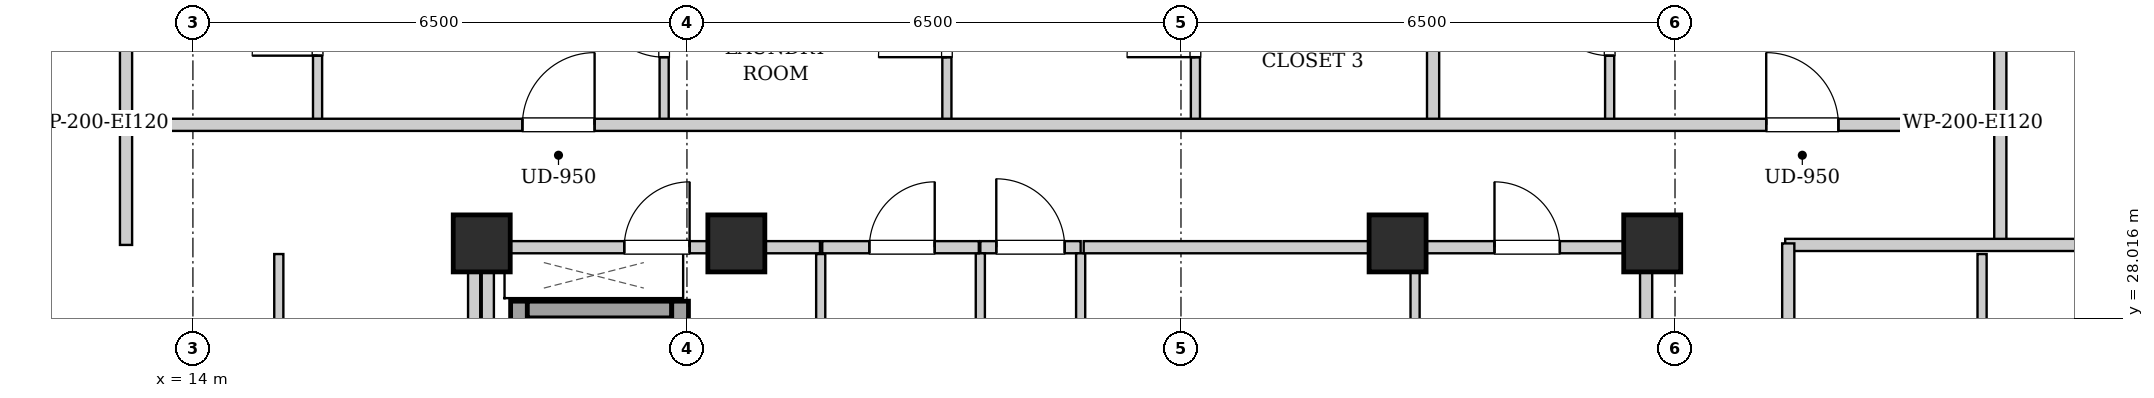
"""IFC4 building model, lengths in metres.
Left out: names, types, materials, properties, quantities, classifications, styles, units other than length and angle.
Written with IfcOpenShell. Run it as: python <this file> out.ifc"""

import sys

from ifc_helpers import new_model, si_unit, direction, frame, frame_2d, origin, origin_2d, place, context, subcontext, project, spatial, rectangle, extrude, element, fill, save


model = new_model("IFC4")
c1 = context("Model", 3, precision=1e-05, world=origin(), true_north=direction((0.0, 1.0)))
c2 = subcontext(c1, "Body", "Model", "MODEL_VIEW")
j1 = project(units=[si_unit("LENGTHUNIT", "METRE"), si_unit("PLANEANGLEUNIT", "RADIAN")], contexts=[c1])
p1 = place(None, origin())
s1 = spatial("IfcSite", under=j1, at=p1, CompositionType="ELEMENT")
p2 = place(p1, origin())
s2 = spatial("IfcBuilding", under=s1, at=p2, CompositionType="ELEMENT")
p3 = place(p2, frame((0.0, 0.0, 227.5)))
s3 = spatial("IfcBuildingStorey", under=s2, at=p3, CompositionType="ELEMENT", Elevation=227.5)
for number, where, z_axis, x_axis in (
    (1, (17.8, 29.0, 0.0), (0.0, 0.0, 1.0), (1.0, 0.0, 0.0)),
    (2, (21.15, 29.0, 0.0), (0.0, 0.0, 1.0), (1.0, 0.0, 0.0)),
    (3, (29.85, 29.0, 0.0), (0.0, 0.0, 1.0), (1.0, 0.0, 0.0)),
    (4, (33.2, 29.0, 0.0), (0.0, 0.0, 1.0), (1.0, 0.0, 0.0)),
):
    element("IfcColumn", number, at=place(p3, frame(where, z_axis=z_axis, x_axis=x_axis)), inside=s3, PredefinedType="COLUMN", context=c2, shape_type="SweptSolid", body=[
        extrude(rectangle(XDim=0.75, YDim=0.75, at=origin_2d()), origin(), (0.0, 0.0, 1.0), 3.4),
    ])
p4 = place(p3, frame((18.29, 24.1, 0.0), z_axis=(0.0, 0.0, 1.0), x_axis=(0.0, 1.0, 0.0)))
e5 = element("IfcWall", 5, at=p4, inside=s3, PredefinedType="SHEAR", context=c2, shape_type="SweptSolid", body=[
    extrude(rectangle(XDim=4.14, YDim=0.22, at=frame_2d((2.07, 0.0))), origin(), (0.0, 0.0, 1.0), 3.14),
])
p5 = place(p3, frame((18.4, 28.13, 0.0), z_axis=(0.0, 0.0, 1.0), x_axis=(1.0, 0.0, 0.0)))
e6 = element("IfcWall", 6, at=p5, inside=s3, PredefinedType="SHEAR", context=c2, shape_type="SweptSolid", body=[
    extrude(rectangle(XDim=1.9, YDim=0.22, at=frame_2d((0.95, 0.0))), origin(), (0.0, 0.0, 1.0), 3.14),
])
p6 = place(p3, frame((20.41, 26.06, 0.0), z_axis=(0.0, 0.0, 1.0), x_axis=(0.0, 1.0, 0.0)))
e7 = element("IfcWall", 7, at=p6, inside=s3, PredefinedType="SHEAR", context=c2, shape_type="SweptSolid", body=[
    extrude(rectangle(XDim=2.18, YDim=0.22, at=frame_2d((1.09, 0.0))), origin(), (0.0, 0.0, 1.0), 3.14),
])
p7 = place(p6, frame((0.54, 0.0, 0.0)))
e8 = element("IfcOpeningElement", 8, at=p7, cuts=e7, PredefinedType="OPENING", context=c2, shape_type="SweptSolid", body=[
    extrude(rectangle(XDim=1.1, YDim=2.15, at=frame_2d((0.55, 1.075))), frame((0.0, 0.12, 0.0), z_axis=(0.0, -1.0, 0.0), x_axis=(1.0, 0.0, 0.0)), (0.0, 0.0, 1.0), 0.24),
])
for number, where, z_axis, x_axis in (
    (9, (17.88, 24.12, 0.0), (0.0, 0.0, 1.0), (0.0, 1.0, 0.0)),
    (10, (33.12, 24.12, 0.0), (0.0, 0.0, 1.0), (0.0, 1.0, 0.0)),
):
    element("IfcWall", number, at=place(p3, frame(where, z_axis=z_axis, x_axis=x_axis)), inside=s3, PredefinedType="PARTITIONING", context=c2, shape_type="SweptSolid", body=[
        extrude(rectangle(XDim=4.76, YDim=0.16, at=frame_2d((2.38, 0.0))), origin(), (0.0, 0.0, 1.0), 2.475),
    ])
p8 = place(p3, frame((24.36, 28.95, 0.0), z_axis=(0.0, 0.0, 1.0), x_axis=(1.0, 0.0, 0.0)))
e11 = element("IfcWall", 11, at=p8, inside=s3, PredefinedType="PARTITIONING", context=c2, shape_type="SweptSolid", body=[
    extrude(rectangle(XDim=1.32, YDim=0.16, at=frame_2d((0.66, 0.0))), origin(), (0.0, 0.0, 1.0), 2.668),
])
p9 = place(p8, frame((0.21, 0.0, 0.0)))
e12 = element("IfcOpeningElement", 12, at=p9, cuts=e11, PredefinedType="OPENING", context=c2, shape_type="SweptSolid", body=[
    extrude(rectangle(XDim=0.9, YDim=2.05, at=frame_2d((0.45, 1.025))), frame((0.0, 0.09, 0.0), z_axis=(0.0, -1.0, 0.0), x_axis=(1.0, 0.0, 0.0)), (0.0, 0.0, 1.0), 0.18),
])
p10 = place(p3, frame((17.96, 28.95, 0.0), z_axis=(0.0, 0.0, 1.0), x_axis=(1.0, 0.0, 0.0)))
e13 = element("IfcWall", 13, at=p10, inside=s3, PredefinedType="PARTITIONING", context=c2, shape_type="SweptSolid", body=[
    extrude(rectangle(XDim=4.29, YDim=0.16, at=frame_2d((2.145, 0.0))), origin(), (0.0, 0.0, 1.0), 2.668),
])
p11 = place(p10, frame((1.715, 0.0, 0.0)))
e14 = element("IfcOpeningElement", 14, at=p11, cuts=e13, PredefinedType="OPENING", context=c2, shape_type="SweptSolid", body=[
    extrude(rectangle(XDim=0.86, YDim=2.05, at=frame_2d((0.43, 1.025))), frame((0.0, 0.09, 0.0), z_axis=(0.0, -1.0, 0.0), x_axis=(1.0, 0.0, 0.0)), (0.0, 0.0, 1.0), 0.18),
])
for number, where, z_axis, x_axis in (
    (15, (24.36, 25.0, 0.0), (0.0, 0.0, 1.0), (0.0, 1.0, 0.0)),
    (16, (25.68, 25.0, 0.0), (0.0, 0.0, 1.0), (0.0, 1.0, 0.0)),
):
    element("IfcWall", number, at=place(p3, frame(where, z_axis=z_axis, x_axis=x_axis)), inside=s3, PredefinedType="PARTITIONING", context=c2, shape_type="SweptSolid", body=[
        extrude(rectangle(XDim=3.87, YDim=0.12, at=frame_2d((1.935, 0.0))), origin(), (0.0, 0.0, 1.0), 3.14),
    ])
p12 = place(p3, frame((30.08, 26.18, 0.0), z_axis=(0.0, 0.0, 1.0), x_axis=(0.0, 1.0, 0.0)))
e17 = element("IfcWall", 17, at=p12, inside=s3, PredefinedType="PARTITIONING", context=c2, shape_type="SweptSolid", body=[
    extrude(rectangle(XDim=2.68, YDim=0.12, at=frame_2d((1.34, 0.0))), origin(), (0.0, 0.0, 1.0), 3.14),
])
p13 = place(p3, frame((30.08, 28.95, 0.0), z_axis=(0.0, 0.0, 1.0), x_axis=(1.0, 0.0, 0.0)))
e18 = element("IfcWall", 18, at=p13, inside=s3, PredefinedType="PARTITIONING", context=c2, shape_type="SweptSolid", body=[
    extrude(rectangle(XDim=2.96, YDim=0.16, at=frame_2d((1.48, 0.0))), origin(), (0.0, 0.0, 1.0), 3.14),
])
p14 = place(p13, frame((1.045, 0.0, 0.0)))
e19 = element("IfcOpeningElement", 19, at=p14, cuts=e18, PredefinedType="OPENING", context=c2, shape_type="SweptSolid", body=[
    extrude(rectangle(XDim=0.86, YDim=2.05, at=frame_2d((0.43, 1.025))), frame((0.0, 0.09, 0.0), z_axis=(0.0, -1.0, 0.0), x_axis=(1.0, 0.0, 0.0)), (0.0, 0.0, 1.0), 0.18),
])
p15 = place(p3, frame((22.26, 25.0, 0.0), z_axis=(0.0, 0.0, 1.0), x_axis=(0.0, 1.0, 0.0)))
e20 = element("IfcWall", 20, at=p15, inside=s3, PredefinedType="PARTITIONING", context=c2, shape_type="SweptSolid", body=[
    extrude(rectangle(XDim=3.86, YDim=0.12, at=frame_2d((1.93, 0.0))), origin(), (0.0, 0.0, 1.0), 3.14),
])
p16 = place(p3, frame((22.28, 28.95, 0.0), z_axis=(0.0, 0.0, 1.0), x_axis=(1.0, 0.0, 0.0)))
e21 = element("IfcWall", 21, at=p16, inside=s3, PredefinedType="PARTITIONING", context=c2, shape_type="SweptSolid", body=[
    extrude(rectangle(XDim=2.06, YDim=0.16, at=frame_2d((1.03, 0.0))), origin(), (0.0, 0.0, 1.0), 2.668),
])
p17 = place(p16, frame((0.62, 0.0, 0.0)))
e22 = element("IfcOpeningElement", 22, at=p17, cuts=e21, PredefinedType="OPENING", context=c2, shape_type="SweptSolid", body=[
    extrude(rectangle(XDim=0.86, YDim=2.05, at=frame_2d((0.43, 1.025))), frame((0.0, 0.09, 0.0), z_axis=(0.0, -1.0, 0.0), x_axis=(1.0, 0.0, 0.0)), (0.0, 0.0, 1.0), 0.18),
])
p18 = place(p3, frame((25.72, 28.95, 0.0), z_axis=(0.0, 0.0, 1.0), x_axis=(1.0, 0.0, 0.0)))
e23 = element("IfcWall", 23, at=p18, inside=s3, PredefinedType="PARTITIONING", context=c2, shape_type="SweptSolid", body=[
    extrude(rectangle(XDim=4.32, YDim=0.16, at=frame_2d((2.16, 0.0))), origin(), (0.0, 0.0, 1.0), 2.668),
])
for number, where, z_axis, x_axis in (
    (24, (13.12, 28.98, 0.0), (0.0, 0.0, 1.0), (0.0, 1.0, 0.0)),
    (25, (37.78, 28.98, 0.0), (0.0, 0.0, 1.0), (0.0, 1.0, 0.0)),
):
    element("IfcWall", number, at=place(p3, frame(where, z_axis=z_axis, x_axis=x_axis)), inside=s3, PredefinedType="PARTITIONING", context=c2, shape_type="SweptSolid", body=[
        extrude(rectangle(XDim=1.58, YDim=0.16, at=frame_2d((0.79, 0.0))), origin(), (0.0, 0.0, 1.0), 3.14),
    ])
p19 = place(p3, frame((34.95, 28.98, 0.0), z_axis=(0.0, 0.0, 1.0), x_axis=(1.0, 0.0, 0.0)))
e26 = element("IfcWall", 26, at=p19, inside=s3, PredefinedType="PARTITIONING", context=c2, shape_type="SweptSolid", body=[
    extrude(rectangle(XDim=5.07, YDim=0.16, at=frame_2d((2.535, 0.0))), origin(), (0.0, 0.0, 1.0), 2.668),
])
p20 = place(p3, frame((13.12, 30.6, 0.0), z_axis=(0.0, 0.0, 1.0), x_axis=(0.0, 1.0, 0.0)))
e27 = element("IfcWall", 27, at=p20, inside=s3, PredefinedType="PARTITIONING", context=c2, shape_type="SweptSolid", body=[
    extrude(rectangle(XDim=2.66, YDim=0.16, at=frame_2d((1.33, 0.0))), origin(), (0.0, 0.0, 1.0), 3.14),
])
p21 = place(p3, frame((15.64, 30.6, 0.0), z_axis=(0.0, 0.0, 1.0), x_axis=(0.0, 1.0, 0.0)))
e28 = element("IfcWall", 28, at=p21, inside=s3, PredefinedType="PARTITIONING", context=c2, shape_type="SweptSolid", body=[
    extrude(rectangle(XDim=2.6, YDim=0.12, at=frame_2d((1.3, 0.0))), origin(), (0.0, 0.0, 1.0), 3.14),
])
p22 = place(p21, frame((0.87, 0.0, 0.0)))
e29 = element("IfcOpeningElement", 29, at=p22, cuts=e28, PredefinedType="OPENING", context=c2, shape_type="SweptSolid", body=[
    extrude(rectangle(XDim=0.86, YDim=2.05, at=frame_2d((0.43, 1.025))), frame((0.0, 0.07, 0.0), z_axis=(0.0, -1.0, 0.0), x_axis=(1.0, 0.0, 0.0)), (0.0, 0.0, 1.0), 0.14),
])
p23 = place(p3, frame((20.2, 30.6, 0.0), z_axis=(0.0, 0.0, 1.0), x_axis=(0.0, 1.0, 0.0)))
e30 = element("IfcWall", 30, at=p23, inside=s3, PredefinedType="PARTITIONING", context=c2, shape_type="SweptSolid", body=[
    extrude(rectangle(XDim=2.6, YDim=0.12, at=frame_2d((1.3, 0.0))), origin(), (0.0, 0.0, 1.0), 3.14),
])
p24 = place(p23, frame((0.85, 0.0, 0.0)))
e31 = element("IfcOpeningElement", 31, at=p24, cuts=e30, PredefinedType="OPENING", context=c2, shape_type="SweptSolid", body=[
    extrude(rectangle(XDim=0.9, YDim=2.05, at=frame_2d((0.45, 1.025))), frame((0.0, 0.07, 0.0), z_axis=(0.0, -1.0, 0.0), x_axis=(1.0, 0.0, 0.0)), (0.0, 0.0, 1.0), 0.14),
])
p25 = place(p3, frame((23.92, 30.6, 0.0), z_axis=(0.0, 0.0, 1.0), x_axis=(0.0, 1.0, 0.0)))
e32 = element("IfcWall", 32, at=p25, inside=s3, PredefinedType="PARTITIONING", context=c2, shape_type="SweptSolid", body=[
    extrude(rectangle(XDim=2.6, YDim=0.12, at=frame_2d((1.3, 0.0))), origin(), (0.0, 0.0, 1.0), 3.14),
])
p26 = place(p25, frame((0.85, 0.0, 0.0)))
e33 = element("IfcOpeningElement", 33, at=p26, cuts=e32, PredefinedType="OPENING", context=c2, shape_type="SweptSolid", body=[
    extrude(rectangle(XDim=0.9, YDim=2.05, at=frame_2d((0.45, 1.025))), frame((0.0, 0.07, 0.0), z_axis=(0.0, -1.0, 0.0), x_axis=(1.0, 0.0, 0.0)), (0.0, 0.0, 1.0), 0.14),
])
p27 = place(p3, frame((27.19, 30.6, 0.0), z_axis=(0.0, 0.0, 1.0), x_axis=(0.0, 1.0, 0.0)))
e34 = element("IfcWall", 34, at=p27, inside=s3, PredefinedType="PARTITIONING", context=c2, shape_type="SweptSolid", body=[
    extrude(rectangle(XDim=2.6, YDim=0.12, at=frame_2d((1.3, 0.0))), origin(), (0.0, 0.0, 1.0), 3.14),
])
p28 = place(p27, frame((0.85, 0.0, 0.0)))
e35 = element("IfcOpeningElement", 35, at=p28, cuts=e34, PredefinedType="OPENING", context=c2, shape_type="SweptSolid", body=[
    extrude(rectangle(XDim=0.9, YDim=2.05, at=frame_2d((0.45, 1.025))), frame((0.0, 0.07, 0.0), z_axis=(0.0, -1.0, 0.0), x_axis=(1.0, 0.0, 0.0)), (0.0, 0.0, 1.0), 0.14),
])
p29 = place(p3, frame((37.78, 30.6, 0.0), z_axis=(0.0, 0.0, 1.0), x_axis=(0.0, 1.0, 0.0)))
e36 = element("IfcWall", 36, at=p29, inside=s3, PredefinedType="PARTITIONING", context=c2, shape_type="SweptSolid", body=[
    extrude(rectangle(XDim=2.66, YDim=0.16, at=frame_2d((1.33, 0.0))), origin(), (0.0, 0.0, 1.0), 3.14),
])
p30 = place(p3, frame((30.317, 30.6, 0.0), z_axis=(0.0, 0.0, 1.0), x_axis=(0.0, 1.0, 0.0)))
e37 = element("IfcWall", 37, at=p30, inside=s3, PredefinedType="PARTITIONING", context=c2, shape_type="SweptSolid", body=[
    extrude(rectangle(XDim=9.32, YDim=0.16, at=frame_2d((4.66, 0.0))), origin(), (0.0, 0.0, 1.0), 3.14),
])
p31 = place(p3, frame((32.64, 30.6, 0.0), z_axis=(0.0, 0.0, 1.0), x_axis=(0.0, 1.0, 0.0)))
e38 = element("IfcWall", 38, at=p31, inside=s3, PredefinedType="PARTITIONING", context=c2, shape_type="SweptSolid", body=[
    extrude(rectangle(XDim=2.6, YDim=0.12, at=frame_2d((1.3, 0.0))), origin(), (0.0, 0.0, 1.0), 3.14),
])
p32 = place(p31, frame((0.87, 0.0, 0.0)))
e39 = element("IfcOpeningElement", 39, at=p32, cuts=e38, PredefinedType="OPENING", context=c2, shape_type="SweptSolid", body=[
    extrude(rectangle(XDim=0.86, YDim=2.05, at=frame_2d((0.43, 1.025))), frame((0.0, 0.07, 0.0), z_axis=(0.0, -1.0, 0.0), x_axis=(1.0, 0.0, 0.0)), (0.0, 0.0, 1.0), 0.14),
])
p33 = place(p3, frame((15.13, 24.552, 0.0), z_axis=(0.0, 0.0, 1.0), x_axis=(0.0, 1.0, 0.0)))
e40 = element("IfcWall", 40, at=p33, inside=s3, PredefinedType="PARTITIONING", context=c2, shape_type="SweptSolid", body=[
    extrude(rectangle(XDim=4.308, YDim=0.12, at=frame_2d((2.154, 0.0))), origin(), (0.0, 0.0, 1.0), 3.14),
])
p34 = place(p33, frame((1.704, 0.0, 0.0)))
e41 = element("IfcOpeningElement", 41, at=p34, cuts=e40, PredefinedType="OPENING", context=c2, shape_type="SweptSolid", body=[
    extrude(rectangle(XDim=0.9, YDim=2.05, at=frame_2d((0.45, 1.025))), frame((0.0, 0.07, 0.0), z_axis=(0.0, -1.0, 0.0), x_axis=(1.0, 0.0, 0.0)), (0.0, 0.0, 1.0), 0.14),
])
p35 = place(p3, frame((37.54, 24.552, 0.0), z_axis=(0.0, 0.0, 1.0), x_axis=(0.0, 1.0, 0.0)))
e42 = element("IfcWall", 42, at=p35, inside=s3, PredefinedType="PARTITIONING", context=c2, shape_type="SweptSolid", body=[
    extrude(rectangle(XDim=4.308, YDim=0.12, at=frame_2d((2.154, 0.0))), origin(), (0.0, 0.0, 1.0), 3.14),
])
p36 = place(p35, frame((1.704, 0.0, 0.0)))
e43 = element("IfcOpeningElement", 43, at=p36, cuts=e42, PredefinedType="OPENING", context=c2, shape_type="SweptSolid", body=[
    extrude(rectangle(XDim=0.9, YDim=2.05, at=frame_2d((0.45, 1.025))), frame((0.0, 0.07, 0.0), z_axis=(0.0, -1.0, 0.0), x_axis=(1.0, 0.0, 0.0)), (0.0, 0.0, 1.0), 0.14),
])
p37 = place(p3, frame((13.15, 30.56, 0.0), z_axis=(0.0, 0.0, 1.0), x_axis=(1.0, 0.0, 0.0)))
e44 = element("IfcWall", 44, at=p37, inside=s3, PredefinedType="PARTITIONING", context=c2, shape_type="SweptSolid", body=[
    extrude(rectangle(XDim=24.6, YDim=0.16, at=frame_2d((12.3, 0.0))), origin(), (0.0, 0.0, 1.0), 3.14),
])
p38 = place(p37, frame((5.185, 0.0, 0.0)))
e45 = element("IfcOpeningElement", 45, at=p38, cuts=e44, PredefinedType="OPENING", context=c2, shape_type="SweptSolid", body=[
    extrude(rectangle(XDim=0.95, YDim=2.1, at=frame_2d((0.475, 1.05))), frame((0.0, 0.09, 0.0), z_axis=(0.0, -1.0, 0.0), x_axis=(1.0, 0.0, 0.0)), (0.0, 0.0, 1.0), 0.18),
])
p39 = place(p37, frame((21.55, 0.0, 0.0)))
e46 = element("IfcOpeningElement", 46, at=p39, cuts=e44, PredefinedType="OPENING", context=c2, shape_type="SweptSolid", body=[
    extrude(rectangle(XDim=0.95, YDim=2.1, at=frame_2d((0.475, 1.05))), frame((0.0, 0.09, 0.0), z_axis=(0.0, -1.0, 0.0), x_axis=(1.0, 0.0, 0.0)), (0.0, 0.0, 1.0), 0.18),
])
p40 = place(p3, frame((17.7, 15.02, 0.0), z_axis=(0.0, 0.0, 1.0), x_axis=(0.0, 1.0, 0.0)))
e47 = element("IfcWall", 47, at=p40, inside=s3, PredefinedType="PARTITIONING", context=c2, shape_type="SweptSolid", body=[
    extrude(rectangle(XDim=13.98, YDim=0.16, at=frame_2d((6.99, 0.0))), origin(), (0.0, 0.0, 1.0), 2.475),
])
p41 = place(p3, frame((34.99, 15.07, 0.0), z_axis=(0.0, 0.0, 1.0), x_axis=(0.0, 1.0, 0.0)))
e48 = element("IfcWall", 48, at=p41, inside=s3, PredefinedType="PARTITIONING", context=c2, shape_type="SweptSolid", body=[
    extrude(rectangle(XDim=13.93, YDim=0.16, at=frame_2d((6.965, 0.0))), origin(), (0.0, 0.0, 1.0), 3.14),
])
p42 = place(p41, frame((4.385, 0.0, 0.0)))
e49 = element("IfcOpeningElement", 49, at=p42, cuts=e48, PredefinedType="OPENING", context=c2, shape_type="SweptSolid", body=[
    extrude(rectangle(XDim=0.95, YDim=2.1, at=frame_2d((0.475, 1.05))), frame((0.0, 0.09, 0.0), z_axis=(0.0, -1.0, 0.0), x_axis=(1.0, 0.0, 0.0)), (0.0, 0.0, 1.0), 0.18),
])
p43 = place(p9, origin())
e50 = element("IfcDoor", 50, at=p43, inside=s3, OperationType="SINGLE_SWING_LEFT", PredefinedType="DOOR", context=c2, shape_type="SweptSolid", body=[
    extrude(rectangle(XDim=0.9, YDim=2.05, at=frame_2d((0.45, 1.025))), frame((0.0, 0.025, 0.0), z_axis=(0.0, -1.0, 0.0), x_axis=(1.0, 0.0, 0.0)), (0.0, 0.0, 1.0), 0.05),
])
fill(e12, e50)
p44 = place(p11, origin())
e51 = element("IfcDoor", 51, at=p44, inside=s3, OperationType="SINGLE_SWING_RIGHT", PredefinedType="DOOR", context=c2, shape_type="SweptSolid", body=[
    extrude(rectangle(XDim=0.86, YDim=2.05, at=frame_2d((0.43, 1.025))), frame((0.0, 0.025, 0.0), z_axis=(0.0, -1.0, 0.0), x_axis=(1.0, 0.0, 0.0)), (0.0, 0.0, 1.0), 0.05),
])
fill(e14, e51)
p45 = place(p14, origin())
e52 = element("IfcDoor", 52, at=p45, inside=s3, OperationType="SINGLE_SWING_LEFT", PredefinedType="DOOR", context=c2, shape_type="SweptSolid", body=[
    extrude(rectangle(XDim=0.86, YDim=2.05, at=frame_2d((0.43, 1.025))), frame((0.0, 0.025, 0.0), z_axis=(0.0, -1.0, 0.0), x_axis=(1.0, 0.0, 0.0)), (0.0, 0.0, 1.0), 0.05),
])
fill(e19, e52)
p46 = place(p17, origin())
e53 = element("IfcDoor", 53, at=p46, inside=s3, OperationType="SINGLE_SWING_RIGHT", PredefinedType="DOOR", context=c2, shape_type="SweptSolid", body=[
    extrude(rectangle(XDim=0.86, YDim=2.05, at=frame_2d((0.43, 1.025))), frame((0.0, 0.025, 0.0), z_axis=(0.0, -1.0, 0.0), x_axis=(1.0, 0.0, 0.0)), (0.0, 0.0, 1.0), 0.05),
])
fill(e22, e53)
p47 = place(p22, origin())
e54 = element("IfcDoor", 54, at=p47, inside=s3, OperationType="SINGLE_SWING_LEFT", PredefinedType="DOOR", context=c2, shape_type="SweptSolid", body=[
    extrude(rectangle(XDim=0.86, YDim=2.05, at=frame_2d((0.43, 1.025))), frame((0.0, 0.025, 0.0), z_axis=(0.0, -1.0, 0.0), x_axis=(1.0, 0.0, 0.0)), (0.0, 0.0, 1.0), 0.05),
])
fill(e29, e54)
p48 = place(p24, origin())
e55 = element("IfcDoor", 55, at=p48, inside=s3, OperationType="SINGLE_SWING_RIGHT", PredefinedType="DOOR", context=c2, shape_type="SweptSolid", body=[
    extrude(rectangle(XDim=0.9, YDim=2.05, at=frame_2d((0.45, 1.025))), frame((0.0, 0.025, 0.0), z_axis=(0.0, -1.0, 0.0), x_axis=(1.0, 0.0, 0.0)), (0.0, 0.0, 1.0), 0.05),
])
fill(e31, e55)
p49 = place(p26, origin())
e56 = element("IfcDoor", 56, at=p49, inside=s3, OperationType="SINGLE_SWING_LEFT", PredefinedType="DOOR", context=c2, shape_type="SweptSolid", body=[
    extrude(rectangle(XDim=0.9, YDim=2.05, at=frame_2d((0.45, 1.025))), frame((0.0, 0.025, 0.0), z_axis=(0.0, -1.0, 0.0), x_axis=(1.0, 0.0, 0.0)), (0.0, 0.0, 1.0), 0.05),
])
fill(e33, e56)
p50 = place(p28, origin())
e57 = element("IfcDoor", 57, at=p50, inside=s3, OperationType="SINGLE_SWING_LEFT", PredefinedType="DOOR", context=c2, shape_type="SweptSolid", body=[
    extrude(rectangle(XDim=0.9, YDim=2.05, at=frame_2d((0.45, 1.025))), frame((0.0, 0.025, 0.0), z_axis=(0.0, -1.0, 0.0), x_axis=(1.0, 0.0, 0.0)), (0.0, 0.0, 1.0), 0.05),
])
fill(e35, e57)
p51 = place(p32, origin())
e58 = element("IfcDoor", 58, at=p51, inside=s3, OperationType="SINGLE_SWING_RIGHT", PredefinedType="DOOR", context=c2, shape_type="SweptSolid", body=[
    extrude(rectangle(XDim=0.86, YDim=2.05, at=frame_2d((0.43, 1.025))), frame((0.0, 0.025, 0.0), z_axis=(0.0, -1.0, 0.0), x_axis=(1.0, 0.0, 0.0)), (0.0, 0.0, 1.0), 0.05),
])
fill(e39, e58)
p52 = place(p38, origin())
e59 = element("IfcDoor", 59, at=p52, inside=s3, OperationType="SINGLE_SWING_RIGHT", PredefinedType="DOOR", context=c2, shape_type="SweptSolid", body=[
    extrude(rectangle(XDim=0.95, YDim=2.1, at=frame_2d((0.475, 1.05))), frame((0.0, 0.025, 0.0), z_axis=(0.0, -1.0, 0.0), x_axis=(1.0, 0.0, 0.0)), (0.0, 0.0, 1.0), 0.05),
])
fill(e45, e59)
p53 = place(p39, origin())
e60 = element("IfcDoor", 60, at=p53, inside=s3, OperationType="SINGLE_SWING_LEFT", PredefinedType="DOOR", context=c2, shape_type="SweptSolid", body=[
    extrude(rectangle(XDim=0.95, YDim=2.1, at=frame_2d((0.475, 1.05))), frame((0.0, 0.025, 0.0), z_axis=(0.0, -1.0, 0.0), x_axis=(1.0, 0.0, 0.0)), (0.0, 0.0, 1.0), 0.05),
])
fill(e46, e60)
save(model, sys.argv[1])
